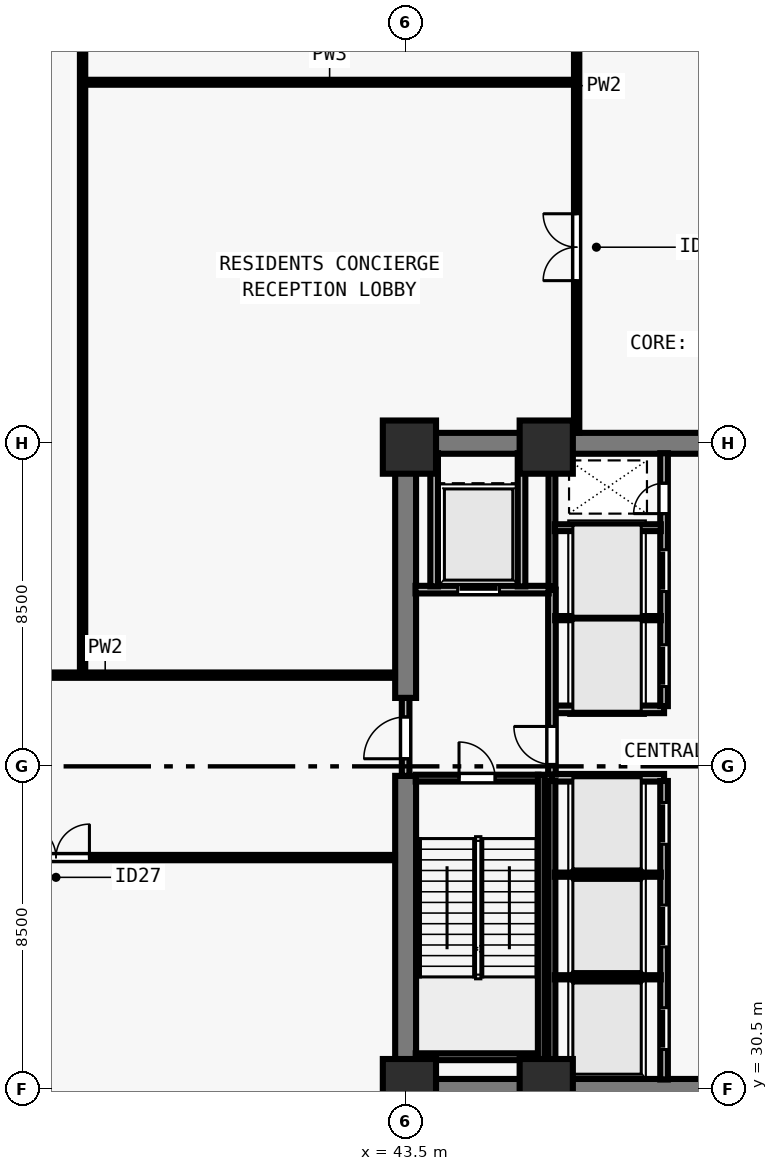
"""IFC4 building model, lengths in metres.
Left out: names, types, materials, properties, quantities, classifications, styles, units other than length and angle.
Written with IfcOpenShell. Run it as: python <this file> out.ifc"""

import sys

from ifc_helpers import new_model, si_unit, direction, frame, frame_2d, origin, origin_2d, place, context, subcontext, project, spatial, rectangle, extrude, element, fill, save


model = new_model("IFC4")
c1 = context("Model", 3, precision=1e-05, world=origin(), true_north=direction((0.0, 1.0)))
c2 = subcontext(c1, "Body", "Model", "MODEL_VIEW")
j1 = project(units=[si_unit("LENGTHUNIT", "METRE"), si_unit("PLANEANGLEUNIT", "RADIAN")], contexts=[c1])
p1 = place(None, origin())
s1 = spatial("IfcSite", under=j1, at=p1, CompositionType="ELEMENT")
p2 = place(p1, origin())
s2 = spatial("IfcBuilding", under=s1, at=p2, CompositionType="ELEMENT")
p3 = place(p2, origin())
s3 = spatial("IfcBuildingStorey", under=s2, at=p3, CompositionType="ELEMENT", Elevation=0.0)
for number, where, z_axis, x_axis in (
    (1, (43.6, 30.6, 0.0), (0.0, 0.0, 1.0), (1.0, 0.0, 0.0)),
    (2, (47.2, 30.6, 0.0), (0.0, 0.0, 1.0), (1.0, 0.0, 0.0)),
    (3, (43.6, 47.4, 0.0), (0.0, 0.0, 1.0), (1.0, 0.0, 0.0)),
    (4, (47.2, 47.4, 0.0), (0.0, 0.0, 1.0), (1.0, 0.0, 0.0)),
):
    element("IfcColumn", number, at=place(p3, frame(where, z_axis=z_axis, x_axis=x_axis)), inside=s3, PredefinedType="COLUMN", context=c2, shape_type="SweptSolid", body=[
        extrude(rectangle(XDim=1.4, YDim=1.4, at=origin_2d()), origin(), (0.0, 0.0, 1.0), 5.0),
    ])
for number, where, z_axis, x_axis in (
    (5, (43.225, 30.5, 0.0), (0.0, 0.0, 1.0), (1.0, 0.0, 0.0)),
    (6, (43.225, 47.5, 0.0), (0.0, 0.0, 1.0), (1.0, 0.0, 0.0)),
):
    element("IfcWall", number, at=place(p3, frame(where, z_axis=z_axis, x_axis=x_axis)), inside=s3, PredefinedType="SHEAR", context=c2, shape_type="SweptSolid", body=[
        extrude(rectangle(XDim=17.55, YDim=0.55, at=frame_2d((8.775, 0.0))), origin(), (0.0, 0.0, 1.0), 4.7),
    ])
p4 = place(p3, frame((43.5, 30.765, 0.0), z_axis=(0.0, 0.0, 1.0), x_axis=(0.0, 1.0, 0.0)))
e7 = element("IfcWall", 7, at=p4, inside=s3, PredefinedType="SHEAR", context=c2, shape_type="SweptSolid", body=[
    extrude(rectangle(XDim=7.985, YDim=0.55, at=frame_2d((3.993, 0.0))), origin(), (0.0, 0.0, 1.0), 4.7),
])
p5 = place(p3, frame((43.5, 40.8, 0.0), z_axis=(0.0, 0.0, 1.0), x_axis=(0.0, 1.0, 0.0)))
e8 = element("IfcWall", 8, at=p5, inside=s3, PredefinedType="SHEAR", context=c2, shape_type="SweptSolid", body=[
    extrude(rectangle(XDim=6.435, YDim=0.55, at=frame_2d((3.218, 0.0))), origin(), (0.0, 0.0, 1.0), 4.7),
])
for number, where, z_axis, x_axis in (
    (9, (47.35, 38.7, 0.0), (0.0, 0.0, 1.0), (1.0, 0.0, 0.0)),
    (10, (47.35, 40.5, 0.0), (0.0, 0.0, 1.0), (1.0, 0.0, 0.0)),
):
    element("IfcWall", number, at=place(p3, frame(where, z_axis=z_axis, x_axis=x_axis)), inside=s3, PredefinedType="SOLIDWALL", context=c2, shape_type="SweptSolid", body=[
        extrude(rectangle(XDim=2.95, YDim=0.2, at=frame_2d((1.475, 0.0))), origin(), (0.0, 0.0, 1.0), 4.7),
    ])
p6 = place(p3, frame((50.3, 30.76, 0.0), z_axis=(0.0, 0.0, 1.0), x_axis=(0.0, 1.0, 0.0)))
e11 = element("IfcWall", 11, at=p6, inside=s3, PredefinedType="SOLIDWALL", context=c2, shape_type="SweptSolid", body=[
    extrude(rectangle(XDim=7.855, YDim=0.2, at=frame_2d((3.927, 0.0))), origin(), (0.0, 0.0, 1.0), 4.7),
])
p7 = place(p6, frame((0.79, 0.0, 0.0)))
e12 = element("IfcOpeningElement", 12, at=p7, cuts=e11, PredefinedType="OPENING", context=c2, shape_type="SweptSolid", body=[
    extrude(rectangle(XDim=1.1, YDim=2.2, at=frame_2d((0.55, 1.1))), frame((0.0, 0.11, 0.0), z_axis=(0.0, -1.0, 0.0), x_axis=(1.0, 0.0, 0.0)), (0.0, 0.0, 1.0), 0.22),
])
p8 = place(p6, frame((3.49, 0.0, 0.0)))
e13 = element("IfcOpeningElement", 13, at=p8, cuts=e11, PredefinedType="OPENING", context=c2, shape_type="SweptSolid", body=[
    extrude(rectangle(XDim=1.1, YDim=2.2, at=frame_2d((0.55, 1.1))), frame((0.0, 0.11, 0.0), z_axis=(0.0, -1.0, 0.0), x_axis=(1.0, 0.0, 0.0)), (0.0, 0.0, 1.0), 0.22),
])
p9 = place(p6, frame((6.19, 0.0, 0.0)))
e14 = element("IfcOpeningElement", 14, at=p9, cuts=e11, PredefinedType="OPENING", context=c2, shape_type="SweptSolid", body=[
    extrude(rectangle(XDim=1.1, YDim=2.2, at=frame_2d((0.55, 1.1))), frame((0.0, 0.11, 0.0), z_axis=(0.0, -1.0, 0.0), x_axis=(1.0, 0.0, 0.0)), (0.0, 0.0, 1.0), 0.22),
])
p10 = place(p3, frame((50.3, 40.585, 0.0), z_axis=(0.0, 0.0, 1.0), x_axis=(0.0, 1.0, 0.0)))
e15 = element("IfcWall", 15, at=p10, inside=s3, PredefinedType="SOLIDWALL", context=c2, shape_type="SweptSolid", body=[
    extrude(rectangle(XDim=6.655, YDim=0.2, at=frame_2d((3.328, 0.0))), origin(), (0.0, 0.0, 1.0), 4.7),
])
p11 = place(p10, frame((0.515, 0.0, 0.0)))
e16 = element("IfcOpeningElement", 16, at=p11, cuts=e15, PredefinedType="OPENING", context=c2, shape_type="SweptSolid", body=[
    extrude(rectangle(XDim=1.1, YDim=2.2, at=frame_2d((0.55, 1.1))), frame((0.0, 0.11, 0.0), z_axis=(0.0, -1.0, 0.0), x_axis=(1.0, 0.0, 0.0)), (0.0, 0.0, 1.0), 0.22),
])
p12 = place(p10, frame((3.015, 0.0, 0.0)))
e17 = element("IfcOpeningElement", 17, at=p12, cuts=e15, PredefinedType="OPENING", context=c2, shape_type="SweptSolid", body=[
    extrude(rectangle(XDim=1.1, YDim=2.2, at=frame_2d((0.55, 1.1))), frame((0.0, 0.11, 0.0), z_axis=(0.0, -1.0, 0.0), x_axis=(1.0, 0.0, 0.0)), (0.0, 0.0, 1.0), 0.22),
])
p13 = place(p10, frame((5.065, 0.0, 0.0)))
e18 = element("IfcOpeningElement", 18, at=p13, cuts=e15, PredefinedType="OPENING", context=c2, shape_type="SweptSolid", body=[
    extrude(rectangle(XDim=0.8, YDim=2.08, at=frame_2d((0.4, 1.04))), frame((0.0, 0.11, 0.0), z_axis=(0.0, -1.0, 0.0), x_axis=(1.0, 0.0, 0.0)), (0.0, 0.0, 1.0), 0.22),
])
p14 = place(p3, frame((43.5, 38.75, 0.0), z_axis=(0.0, 0.0, 1.0), x_axis=(0.0, 1.0, 0.0)))
e19 = element("IfcWall", 19, at=p14, inside=s3, PredefinedType="SOLIDWALL", context=c2, shape_type="SweptSolid", body=[
    extrude(rectangle(XDim=2.05, YDim=0.2, at=frame_2d((1.025, 0.0))), origin(), (0.0, 0.0, 1.0), 4.7),
])
p15 = place(p14, frame((0.45, 0.0, 0.0)))
e20 = element("IfcOpeningElement", 20, at=p15, cuts=e19, PredefinedType="OPENING", context=c2, shape_type="SweptSolid", body=[
    extrude(rectangle(XDim=1.1, YDim=2.15, at=frame_2d((0.55, 1.075))), frame((0.0, 0.11, 0.0), z_axis=(0.0, -1.0, 0.0), x_axis=(1.0, 0.0, 0.0)), (0.0, 0.0, 1.0), 0.22),
])
p16 = place(p3, frame((47.35, 38.785, 0.0), z_axis=(0.0, 0.0, 1.0), x_axis=(0.0, 1.0, 0.0)))
e21 = element("IfcWall", 21, at=p16, inside=s3, PredefinedType="SOLIDWALL", context=c2, shape_type="SweptSolid", body=[
    extrude(rectangle(XDim=4.865, YDim=0.2, at=frame_2d((2.433, 0.0))), origin(), (0.0, 0.0, 1.0), 4.7),
])
p17 = place(p16, frame((0.265, 0.0, 0.0)))
e22 = element("IfcOpeningElement", 22, at=p17, cuts=e21, PredefinedType="OPENING", context=c2, shape_type="SweptSolid", body=[
    extrude(rectangle(XDim=1.0, YDim=2.15, at=frame_2d((0.5, 1.075))), frame((0.0, 0.11, 0.0), z_axis=(0.0, -1.0, 0.0), x_axis=(1.0, 0.0, 0.0)), (0.0, 0.0, 1.0), 0.22),
])
p18 = place(p3, frame((43.76, 43.65, 0.0), z_axis=(0.0, 0.0, 1.0), x_axis=(1.0, 0.0, 0.0)))
e23 = element("IfcWall", 23, at=p18, inside=s3, PredefinedType="SOLIDWALL", context=c2, shape_type="SweptSolid", body=[
    extrude(rectangle(XDim=3.505, YDim=0.2, at=frame_2d((1.752, 0.0))), origin(), (0.0, 0.0, 1.0), 4.7),
])
p19 = place(p18, frame((1.11, 0.0, 0.0)))
e24 = element("IfcOpeningElement", 24, at=p19, cuts=e23, PredefinedType="OPENING", context=c2, shape_type="SweptSolid", body=[
    extrude(rectangle(XDim=1.1, YDim=2.2, at=frame_2d((0.55, 1.1))), frame((0.0, 0.11, 0.0), z_axis=(0.0, -1.0, 0.0), x_axis=(1.0, 0.0, 0.0)), (0.0, 0.0, 1.0), 0.22),
])
for number, where, z_axis, x_axis in (
    (25, (46.55, 43.735, 0.0), (0.0, 0.0, 1.0), (0.0, 1.0, 0.0)),
    (26, (44.25, 43.735, 0.0), (0.0, 0.0, 1.0), (0.0, 1.0, 0.0)),
):
    element("IfcWall", number, at=place(p3, frame(where, z_axis=z_axis, x_axis=x_axis)), inside=s3, PredefinedType="SOLIDWALL", context=c2, shape_type="SweptSolid", body=[
        extrude(rectangle(XDim=3.505, YDim=0.2, at=frame_2d((1.752, 0.0))), origin(), (0.0, 0.0, 1.0), 4.7),
    ])
p20 = place(p3, frame((47.35, 30.76, 0.0), z_axis=(0.0, 0.0, 1.0), x_axis=(0.0, 1.0, 0.0)))
e27 = element("IfcWall", 27, at=p20, inside=s3, PredefinedType="SOLIDWALL", context=c2, shape_type="SweptSolid", body=[
    extrude(rectangle(XDim=7.855, YDim=0.18, at=frame_2d((3.927, 0.0))), origin(), (0.0, 0.0, 1.0), 4.7),
])
for number, where, z_axis, x_axis in (
    (28, (47.425, 33.45, 0.0), (0.0, 0.0, 1.0), (1.0, 0.0, 0.0)),
    (29, (47.425, 36.15, 0.0), (0.0, 0.0, 1.0), (1.0, 0.0, 0.0)),
):
    element("IfcWall", number, at=place(p3, frame(where, z_axis=z_axis, x_axis=x_axis)), inside=s3, PredefinedType="PARTITIONING", context=c2, shape_type="SweptSolid", body=[
        extrude(rectangle(XDim=2.79, YDim=0.11, at=frame_2d((1.395, 0.0))), origin(), (0.0, 0.0, 1.0), 4.7),
    ])
p21 = place(p3, frame((47.35, 43.735, 0.0), z_axis=(0.0, 0.0, 1.0), x_axis=(0.0, 1.0, 0.0)))
e30 = element("IfcWall", 30, at=p21, inside=s3, PredefinedType="SOLIDWALL", context=c2, shape_type="SweptSolid", body=[
    extrude(rectangle(XDim=3.505, YDim=0.18, at=frame_2d((1.752, 0.0))), origin(), (0.0, 0.0, 1.0), 4.7),
])
p22 = place(p3, frame((47.435, 42.9, 0.0), z_axis=(0.0, 0.0, 1.0), x_axis=(1.0, 0.0, 0.0)))
e31 = element("IfcWall", 31, at=p22, inside=s3, PredefinedType="PARTITIONING", context=c2, shape_type="SweptSolid", body=[
    extrude(rectangle(XDim=2.78, YDim=0.11, at=frame_2d((1.39, 0.0))), origin(), (0.0, 0.0, 1.0), 4.7),
])
p23 = place(p3, frame((47.425, 45.28, 0.0), z_axis=(0.0, 0.0, 1.0), x_axis=(1.0, 0.0, 0.0)))
e32 = element("IfcWall", 32, at=p23, inside=s3, PredefinedType="SOLIDWALL", context=c2, shape_type="SweptSolid", body=[
    extrude(rectangle(XDim=2.79, YDim=0.18, at=frame_2d((1.395, 0.0))), origin(), (0.0, 0.0, 1.0), 4.7),
])
p24 = place(p3, frame((48.0, 47.78, 0.0), z_axis=(0.0, 0.0, 1.0), x_axis=(0.0, 1.0, 0.0)))
e33 = element("IfcWall", 33, at=p24, inside=s3, PredefinedType="PARTITIONING", context=c2, shape_type="SweptSolid", body=[
    extrude(rectangle(XDim=17.8, YDim=0.14, at=frame_2d((8.9, 0.0))), origin(), (0.0, 0.0, 1.0), 4.7),
])
p25 = place(p24, frame((4.0, 0.0, 0.0)))
e34 = element("IfcOpeningElement", 34, at=p25, cuts=e33, PredefinedType="OPENING", context=c2, shape_type="SweptSolid", body=[
    extrude(rectangle(XDim=1.76, YDim=2.2, at=frame_2d((0.88, 1.1))), frame((0.0, 0.08, 0.0), z_axis=(0.0, -1.0, 0.0), x_axis=(1.0, 0.0, 0.0)), (0.0, 0.0, 1.0), 0.16),
])
p26 = place(p24, frame((12.5, 0.0, 0.0)))
e35 = element("IfcOpeningElement", 35, at=p26, cuts=e33, PredefinedType="OPENING", context=c2, shape_type="SweptSolid", body=[
    extrude(rectangle(XDim=0.95, YDim=2.1, at=frame_2d((0.475, 1.05))), frame((0.0, 0.08, 0.0), z_axis=(0.0, -1.0, 0.0), x_axis=(1.0, 0.0, 0.0)), (0.0, 0.0, 1.0), 0.16),
])
p27 = place(p3, frame((18.42, 36.6, 0.0), z_axis=(0.0, 0.0, 1.0), x_axis=(1.0, 0.0, 0.0)))
e36 = element("IfcWall", 36, at=p27, inside=s3, PredefinedType="PARTITIONING", context=c2, shape_type="SweptSolid", body=[
    extrude(rectangle(XDim=24.8, YDim=0.14, at=frame_2d((12.4, 0.0))), origin(), (0.0, 0.0, 1.0), 4.7),
])
p28 = place(p27, frame((4.5, 0.0, 0.0)))
e37 = element("IfcOpeningElement", 37, at=p28, cuts=e36, PredefinedType="OPENING", context=c2, shape_type="SweptSolid", body=[
    extrude(rectangle(XDim=1.4, YDim=2.2, at=frame_2d((0.7, 1.1))), frame((0.0, 0.08, 0.0), z_axis=(0.0, -1.0, 0.0), x_axis=(1.0, 0.0, 0.0)), (0.0, 0.0, 1.0), 0.16),
])
p29 = place(p27, frame((15.0, 0.0, 0.0)))
e38 = element("IfcOpeningElement", 38, at=p29, cuts=e36, PredefinedType="OPENING", context=c2, shape_type="SweptSolid", body=[
    extrude(rectangle(XDim=1.76, YDim=2.2, at=frame_2d((0.88, 1.1))), frame((0.0, 0.08, 0.0), z_axis=(0.0, -1.0, 0.0), x_axis=(1.0, 0.0, 0.0)), (0.0, 0.0, 1.0), 0.16),
])
p30 = place(p3, frame((18.42, 41.4, 0.0), z_axis=(0.0, 0.0, 1.0), x_axis=(1.0, 0.0, 0.0)))
e39 = element("IfcWall", 39, at=p30, inside=s3, PredefinedType="PARTITIONING", context=c2, shape_type="SweptSolid", body=[
    extrude(rectangle(XDim=24.8, YDim=0.14, at=frame_2d((12.4, 0.0))), origin(), (0.0, 0.0, 1.0), 4.7),
])
p31 = place(p30, frame((8.0, 0.0, 0.0)))
e40 = element("IfcOpeningElement", 40, at=p31, cuts=e39, PredefinedType="OPENING", context=c2, shape_type="SweptSolid", body=[
    extrude(rectangle(XDim=1.4, YDim=2.2, at=frame_2d((0.7, 1.1))), frame((0.0, 0.08, 0.0), z_axis=(0.0, -1.0, 0.0), x_axis=(1.0, 0.0, 0.0)), (0.0, 0.0, 1.0), 0.16),
])
p32 = place(p3, frame((35.0, 41.455, 0.0), z_axis=(0.0, 0.0, 1.0), x_axis=(0.0, 1.0, 0.0)))
e41 = element("IfcWall", 41, at=p32, inside=s3, PredefinedType="PARTITIONING", context=c2, shape_type="SweptSolid", body=[
    extrude(rectangle(XDim=24.125, YDim=0.14, at=frame_2d((12.062, 0.0))), origin(), (0.0, 0.0, 1.0), 3.751),
])
p33 = place(p3, frame((35.055, 57.0, 0.0), z_axis=(0.0, 0.0, 1.0), x_axis=(1.0, 0.0, 0.0)))
e42 = element("IfcWall", 42, at=p33, inside=s3, PredefinedType="PLUMBINGWALL", context=c2, shape_type="SweptSolid", body=[
    extrude(rectangle(XDim=12.89, YDim=0.13, at=frame_2d((6.445, 0.0))), origin(), (0.0, 0.0, 1.0), 4.7),
])
p34 = place(p3, frame((43.765, 38.69, 0.0), z_axis=(0.0, 0.0, 1.0), x_axis=(1.0, 0.0, 0.0)))
e43 = element("IfcWall", 43, at=p34, inside=s3, PredefinedType="SOLIDWALL", context=c2, shape_type="SweptSolid", body=[
    extrude(rectangle(XDim=3.23, YDim=0.18, at=frame_2d((1.615, 0.0))), origin(), (0.0, 0.0, 1.0), 4.7),
])
p35 = place(p34, frame((1.14, 0.0, 0.0)))
e44 = element("IfcOpeningElement", 44, at=p35, cuts=e43, PredefinedType="OPENING", context=c2, shape_type="SweptSolid", body=[
    extrude(rectangle(XDim=0.95, YDim=2.15, at=frame_2d((0.475, 1.075))), frame((0.0, 0.1, 0.0), z_axis=(0.0, -1.0, 0.0), x_axis=(1.0, 0.0, 0.0)), (0.0, 0.0, 1.0), 0.2),
])
p36 = place(p3, frame((43.765, 31.36, 0.0), z_axis=(0.0, 0.0, 1.0), x_axis=(1.0, 0.0, 0.0)))
e45 = element("IfcWall", 45, at=p36, inside=s3, PredefinedType="SOLIDWALL", context=c2, shape_type="SweptSolid", body=[
    extrude(rectangle(XDim=3.23, YDim=0.18, at=frame_2d((1.615, 0.0))), origin(), (0.0, 0.0, 1.0), 4.7),
])
p37 = place(p3, frame((47.07, 38.78, 0.0), z_axis=(0.0, 0.0, 1.0), x_axis=(0.0, -1.0, 0.0)))
e46 = element("IfcWall", 46, at=p37, inside=s3, PredefinedType="SOLIDWALL", context=c2, shape_type="SweptSolid", body=[
    extrude(rectangle(XDim=8.017, YDim=0.18, at=frame_2d((4.009, 0.0))), origin(), (0.0, 0.0, 1.0), 4.7),
])
p38 = place(p15, origin())
e47 = element("IfcDoor", 47, at=p38, inside=s3, OperationType="SINGLE_SWING_LEFT", PredefinedType="DOOR", context=c2, shape_type="SweptSolid", body=[
    extrude(rectangle(XDim=1.1, YDim=2.15, at=frame_2d((0.55, 1.075))), frame((0.0, 0.025, 0.0), z_axis=(0.0, -1.0, 0.0), x_axis=(1.0, 0.0, 0.0)), (0.0, 0.0, 1.0), 0.05),
])
fill(e20, e47)
p39 = place(p17, origin())
e48 = element("IfcDoor", 48, at=p39, inside=s3, OperationType="SINGLE_SWING_RIGHT", PredefinedType="DOOR", context=c2, shape_type="SweptSolid", body=[
    extrude(rectangle(XDim=1.0, YDim=2.15, at=frame_2d((0.5, 1.075))), frame((0.0, 0.025, 0.0), z_axis=(0.0, -1.0, 0.0), x_axis=(1.0, 0.0, 0.0)), (0.0, 0.0, 1.0), 0.05),
])
fill(e22, e48)
p40 = place(p19, origin())
e49 = element("IfcDoor", 49, at=p40, inside=s3, OperationType="SLIDING_TO_LEFT", PredefinedType="DOOR", context=c2, shape_type="SweptSolid", body=[
    extrude(rectangle(XDim=1.1, YDim=2.2, at=frame_2d((0.55, 1.1))), frame((0.0, 0.025, 0.0), z_axis=(0.0, -1.0, 0.0), x_axis=(1.0, 0.0, 0.0)), (0.0, 0.0, 1.0), 0.05),
])
fill(e24, e49)
p41 = place(p7, origin())
e50 = element("IfcDoor", 50, at=p41, inside=s3, OperationType="SLIDING_TO_LEFT", PredefinedType="DOOR", context=c2, shape_type="SweptSolid", body=[
    extrude(rectangle(XDim=1.1, YDim=2.2, at=frame_2d((0.55, 1.1))), frame((0.0, 0.025, 0.0), z_axis=(0.0, -1.0, 0.0), x_axis=(1.0, 0.0, 0.0)), (0.0, 0.0, 1.0), 0.05),
])
fill(e12, e50)
p42 = place(p8, origin())
e51 = element("IfcDoor", 51, at=p42, inside=s3, OperationType="SLIDING_TO_LEFT", PredefinedType="DOOR", context=c2, shape_type="SweptSolid", body=[
    extrude(rectangle(XDim=1.1, YDim=2.2, at=frame_2d((0.55, 1.1))), frame((0.0, 0.025, 0.0), z_axis=(0.0, -1.0, 0.0), x_axis=(1.0, 0.0, 0.0)), (0.0, 0.0, 1.0), 0.05),
])
fill(e13, e51)
p43 = place(p9, origin())
e52 = element("IfcDoor", 52, at=p43, inside=s3, OperationType="SLIDING_TO_LEFT", PredefinedType="DOOR", context=c2, shape_type="SweptSolid", body=[
    extrude(rectangle(XDim=1.1, YDim=2.2, at=frame_2d((0.55, 1.1))), frame((0.0, 0.025, 0.0), z_axis=(0.0, -1.0, 0.0), x_axis=(1.0, 0.0, 0.0)), (0.0, 0.0, 1.0), 0.05),
])
fill(e14, e52)
p44 = place(p11, origin())
e53 = element("IfcDoor", 53, at=p44, inside=s3, OperationType="SLIDING_TO_LEFT", PredefinedType="DOOR", context=c2, shape_type="SweptSolid", body=[
    extrude(rectangle(XDim=1.1, YDim=2.2, at=frame_2d((0.55, 1.1))), frame((0.0, 0.025, 0.0), z_axis=(0.0, -1.0, 0.0), x_axis=(1.0, 0.0, 0.0)), (0.0, 0.0, 1.0), 0.05),
])
fill(e16, e53)
p45 = place(p12, origin())
e54 = element("IfcDoor", 54, at=p45, inside=s3, OperationType="SLIDING_TO_LEFT", PredefinedType="DOOR", context=c2, shape_type="SweptSolid", body=[
    extrude(rectangle(XDim=1.1, YDim=2.2, at=frame_2d((0.55, 1.1))), frame((0.0, 0.025, 0.0), z_axis=(0.0, -1.0, 0.0), x_axis=(1.0, 0.0, 0.0)), (0.0, 0.0, 1.0), 0.05),
])
fill(e17, e54)
p46 = place(p13, origin())
e55 = element("IfcDoor", 55, at=p46, inside=s3, OperationType="SINGLE_SWING_LEFT", PredefinedType="DOOR", context=c2, shape_type="SweptSolid", body=[
    extrude(rectangle(XDim=0.8, YDim=2.08, at=frame_2d((0.4, 1.04))), frame((0.0, 0.025, 0.0), z_axis=(0.0, -1.0, 0.0), x_axis=(1.0, 0.0, 0.0)), (0.0, 0.0, 1.0), 0.05),
])
fill(e18, e55)
p47 = place(p29, origin())
e56 = element("IfcDoor", 56, at=p47, inside=s3, OperationType="DOUBLE_DOOR_SINGLE_SWING", PredefinedType="DOOR", context=c2, shape_type="SweptSolid", body=[
    extrude(rectangle(XDim=1.76, YDim=2.2, at=frame_2d((0.88, 1.1))), frame((0.0, 0.025, 0.0), z_axis=(0.0, -1.0, 0.0), x_axis=(1.0, 0.0, 0.0)), (0.0, 0.0, 1.0), 0.05),
])
fill(e38, e56)
p48 = place(p25, origin())
e57 = element("IfcDoor", 57, at=p48, inside=s3, OperationType="DOUBLE_DOOR_SINGLE_SWING", PredefinedType="DOOR", context=c2, shape_type="SweptSolid", body=[
    extrude(rectangle(XDim=1.76, YDim=2.2, at=frame_2d((0.88, 1.1))), frame((0.0, 0.025, 0.0), z_axis=(0.0, -1.0, 0.0), x_axis=(1.0, 0.0, 0.0)), (0.0, 0.0, 1.0), 0.05),
])
fill(e34, e57)
p49 = place(p35, origin())
e58 = element("IfcDoor", 58, at=p49, inside=s3, OperationType="SINGLE_SWING_LEFT", PredefinedType="DOOR", context=c2, shape_type="SweptSolid", body=[
    extrude(rectangle(XDim=0.95, YDim=2.15, at=frame_2d((0.475, 1.075))), frame((0.0, 0.025, 0.0), z_axis=(0.0, -1.0, 0.0), x_axis=(1.0, 0.0, 0.0)), (0.0, 0.0, 1.0), 0.05),
])
fill(e44, e58)
save(model, sys.argv[1])
